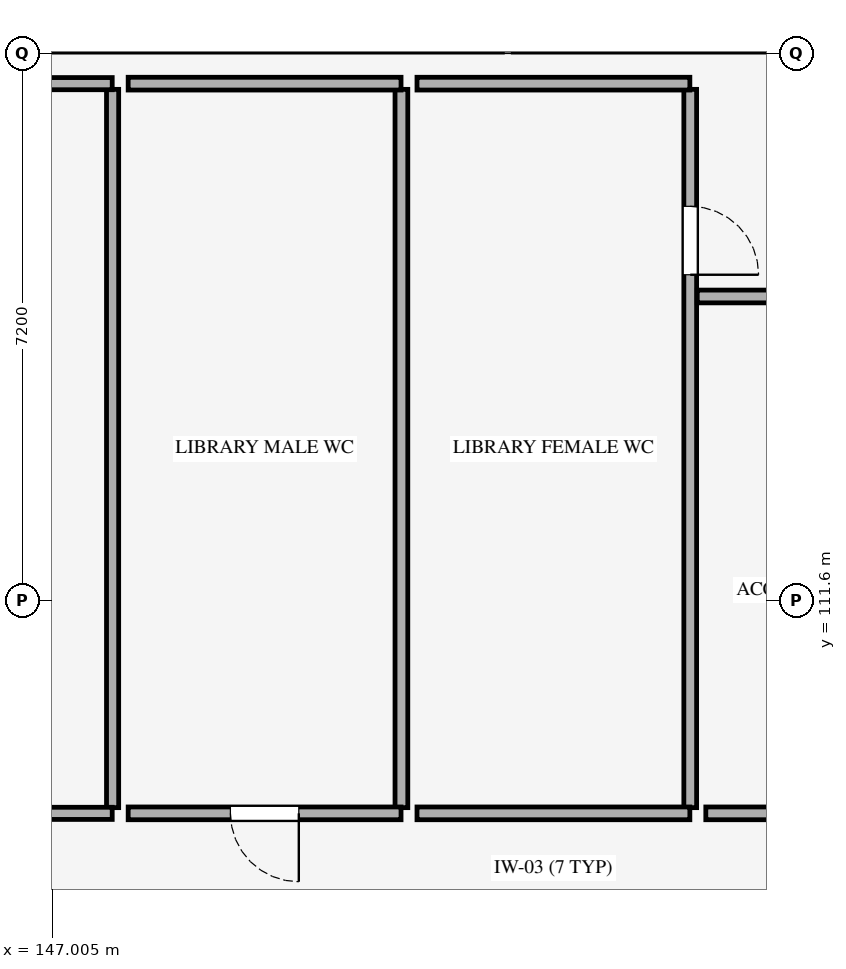
"""IFC4 building model, lengths in metres.
Left out: names, types, materials, properties, quantities, classifications, styles, units other than length and angle.
Written with IfcOpenShell. Run it as: python <this file> out.ifc"""

import sys

from ifc_helpers import new_model, si_unit, direction, frame, frame_2d, origin, place, context, subcontext, project, spatial, rectangle, extrude, element, fill, save


model = new_model("IFC4")
c1 = context("Model", 3, precision=1e-05, world=origin(), true_north=direction((0.0, 1.0)))
c2 = subcontext(c1, "Body", "Model", "MODEL_VIEW")
j1 = project(units=[si_unit("LENGTHUNIT", "METRE"), si_unit("PLANEANGLEUNIT", "RADIAN")], contexts=[c1])
p1 = place(None, origin())
s1 = spatial("IfcSite", under=j1, at=p1, CompositionType="ELEMENT")
p2 = place(p1, origin())
s2 = spatial("IfcBuilding", under=s1, at=p2, CompositionType="ELEMENT")
p3 = place(p2, frame((0.0, 0.0, 4.8)))
s3 = spatial("IfcBuildingStorey", under=s2, at=p3, CompositionType="ELEMENT", Elevation=4.8)
p4 = place(p3, frame((147.8, 118.325, 0.0), z_axis=(0.0, 0.0, 1.0), x_axis=(0.0, -1.0, 0.0)))
e1 = element("IfcWall", 1, at=p4, inside=s3, PredefinedType="STANDARD", context=c2, shape_type="SweptSolid", body=[
    extrude(rectangle(XDim=9.45, YDim=0.16, at=frame_2d((4.725, 0.0))), origin(), (0.0, 0.0, 1.0), 3.755),
])
p5 = place(p3, frame((147.795, 108.8, 0.0), z_axis=(0.0, 0.0, 1.0), x_axis=(-1.0, 0.0, 0.0)))
e2 = element("IfcWall", 2, at=p5, inside=s3, PredefinedType="STANDARD", context=c2, shape_type="SweptSolid", body=[
    extrude(rectangle(XDim=13.59, YDim=0.16, at=frame_2d((6.795, 0.0))), origin(), (0.0, 0.0, 1.0), 4.54),
])
p6 = place(p5, frame((6.22, 0.0, 0.0)))
e3 = element("IfcOpeningElement", 3, at=p6, cuts=e2, PredefinedType="OPENING", context=c2, shape_type="SweptSolid", body=[
    extrude(rectangle(XDim=1.15, YDim=2.15, at=frame_2d((0.575, 1.075))), frame((0.0, 0.09, 0.0), z_axis=(0.0, -1.0, 0.0), x_axis=(1.0, 0.0, 0.0)), (0.0, 0.0, 1.0), 0.18),
])
p7 = place(p3, frame((134.205, 118.4, 0.0), z_axis=(0.0, 0.0, 1.0), x_axis=(1.0, 0.0, 0.0)))
e4 = element("IfcWall", 4, at=p7, inside=s3, PredefinedType="STANDARD", context=c2, shape_type="SweptSolid", body=[
    extrude(rectangle(XDim=13.59, YDim=0.16, at=frame_2d((6.795, 0.0))), origin(), (0.0, 0.0, 1.0), 3.755),
])
p8 = place(p3, frame((151.6, 118.325, 0.0), z_axis=(0.0, 0.0, 1.0), x_axis=(0.0, -1.0, 0.0)))
e5 = element("IfcWall", 5, at=p8, inside=s3, PredefinedType="STANDARD", context=c2, shape_type="SweptSolid", body=[
    extrude(rectangle(XDim=9.45, YDim=0.168, at=frame_2d((4.725, 0.0))), origin(), (0.0, 0.0, 1.0), 3.755),
])
p9 = place(p3, frame((151.595, 108.8, 0.0), z_axis=(0.0, 0.0, 1.0), x_axis=(-1.0, 0.0, 0.0)))
e6 = element("IfcWall", 6, at=p9, inside=s3, PredefinedType="STANDARD", context=c2, shape_type="SweptSolid", body=[
    extrude(rectangle(XDim=3.59, YDim=0.168, at=frame_2d((1.795, 0.0))), origin(), (0.0, 0.0, 1.0), 4.255),
])
p10 = place(p9, frame((1.345, 0.0, 0.0)))
e7 = element("IfcOpeningElement", 7, at=p10, cuts=e6, PredefinedType="OPENING", context=c2, shape_type="SweptSolid", body=[
    extrude(rectangle(XDim=0.9, YDim=2.1, at=frame_2d((0.45, 1.05))), frame((0.0, 0.094, 0.0), z_axis=(0.0, -1.0, 0.0), x_axis=(1.0, 0.0, 0.0)), (0.0, 0.0, 1.0), 0.188),
])
p11 = place(p3, frame((148.005, 118.4, 0.0), z_axis=(0.0, 0.0, 1.0), x_axis=(1.0, 0.0, 0.0)))
e8 = element("IfcWall", 8, at=p11, inside=s3, PredefinedType="STANDARD", context=c2, shape_type="SweptSolid", body=[
    extrude(rectangle(XDim=3.59, YDim=0.168, at=frame_2d((1.795, 0.0))), origin(), (0.0, 0.0, 1.0), 3.755),
])
p12 = place(p3, frame((155.4, 118.325, 0.0), z_axis=(0.0, 0.0, 1.0), x_axis=(0.0, -1.0, 0.0)))
e9 = element("IfcWall", 9, at=p12, inside=s3, PredefinedType="STANDARD", context=c2, shape_type="SweptSolid", body=[
    extrude(rectangle(XDim=9.45, YDim=0.168, at=frame_2d((4.725, 0.0))), origin(), (0.0, 0.0, 1.0), 3.755),
])
p13 = place(p12, frame((1.539, 0.0, 0.0)))
e10 = element("IfcOpeningElement", 10, at=p13, cuts=e9, PredefinedType="OPENING", context=c2, shape_type="SweptSolid", body=[
    extrude(rectangle(XDim=0.9, YDim=2.1, at=frame_2d((0.45, 1.05))), frame((0.0, 0.094, 0.0), z_axis=(0.0, -1.0, 0.0), x_axis=(1.0, 0.0, 0.0)), (0.0, 0.0, 1.0), 0.188),
])
p14 = place(p3, frame((155.395, 108.8, 0.0), z_axis=(0.0, 0.0, 1.0), x_axis=(-1.0, 0.0, 0.0)))
e11 = element("IfcWall", 11, at=p14, inside=s3, PredefinedType="STANDARD", context=c2, shape_type="SweptSolid", body=[
    extrude(rectangle(XDim=3.59, YDim=0.168, at=frame_2d((1.795, 0.0))), origin(), (0.0, 0.0, 1.0), 4.255),
])
p15 = place(p3, frame((151.805, 118.4, 0.0), z_axis=(0.0, 0.0, 1.0), x_axis=(1.0, 0.0, 0.0)))
e12 = element("IfcWall", 12, at=p15, inside=s3, PredefinedType="STANDARD", context=c2, shape_type="SweptSolid", body=[
    extrude(rectangle(XDim=3.59, YDim=0.168, at=frame_2d((1.795, 0.0))), origin(), (0.0, 0.0, 1.0), 3.755),
])
p16 = place(p3, frame((158.395, 108.8, 0.0), z_axis=(0.0, 0.0, 1.0), x_axis=(-1.0, 0.0, 0.0)))
e13 = element("IfcWall", 13, at=p16, inside=s3, PredefinedType="STANDARD", context=c2, shape_type="SweptSolid", body=[
    extrude(rectangle(XDim=2.79, YDim=0.168, at=frame_2d((1.395, 0.0))), origin(), (0.0, 0.0, 1.0), 4.54),
])
p17 = place(p3, frame((155.492, 115.6, 0.0), z_axis=(0.0, 0.0, 1.0), x_axis=(1.0, 0.0, 0.0)))
e14 = element("IfcWall", 14, at=p17, inside=s3, PredefinedType="STANDARD", context=c2, shape_type="SweptSolid", body=[
    extrude(rectangle(XDim=2.903, YDim=0.168, at=frame_2d((1.452, 0.0))), origin(), (0.0, 0.0, 1.0), 4.54),
])
p18 = place(p10, origin())
e15 = element("IfcDoor", 15, at=p18, inside=s3, OperationType="SINGLE_SWING_LEFT", PredefinedType="DOOR", context=c2, shape_type="SweptSolid", body=[
    extrude(rectangle(XDim=0.9, YDim=2.1, at=frame_2d((0.45, 1.05))), frame((0.0, 0.025, 0.0), z_axis=(0.0, -1.0, 0.0), x_axis=(1.0, 0.0, 0.0)), (0.0, 0.0, 1.0), 0.05),
])
fill(e7, e15)
p19 = place(p13, origin())
e16 = element("IfcDoor", 16, at=p19, inside=s3, OperationType="SINGLE_SWING_RIGHT", PredefinedType="DOOR", context=c2, shape_type="SweptSolid", body=[
    extrude(rectangle(XDim=0.9, YDim=2.1, at=frame_2d((0.45, 1.05))), frame((0.0, 0.025, 0.0), z_axis=(0.0, -1.0, 0.0), x_axis=(1.0, 0.0, 0.0)), (0.0, 0.0, 1.0), 0.05),
])
fill(e10, e16)
save(model, sys.argv[1])
